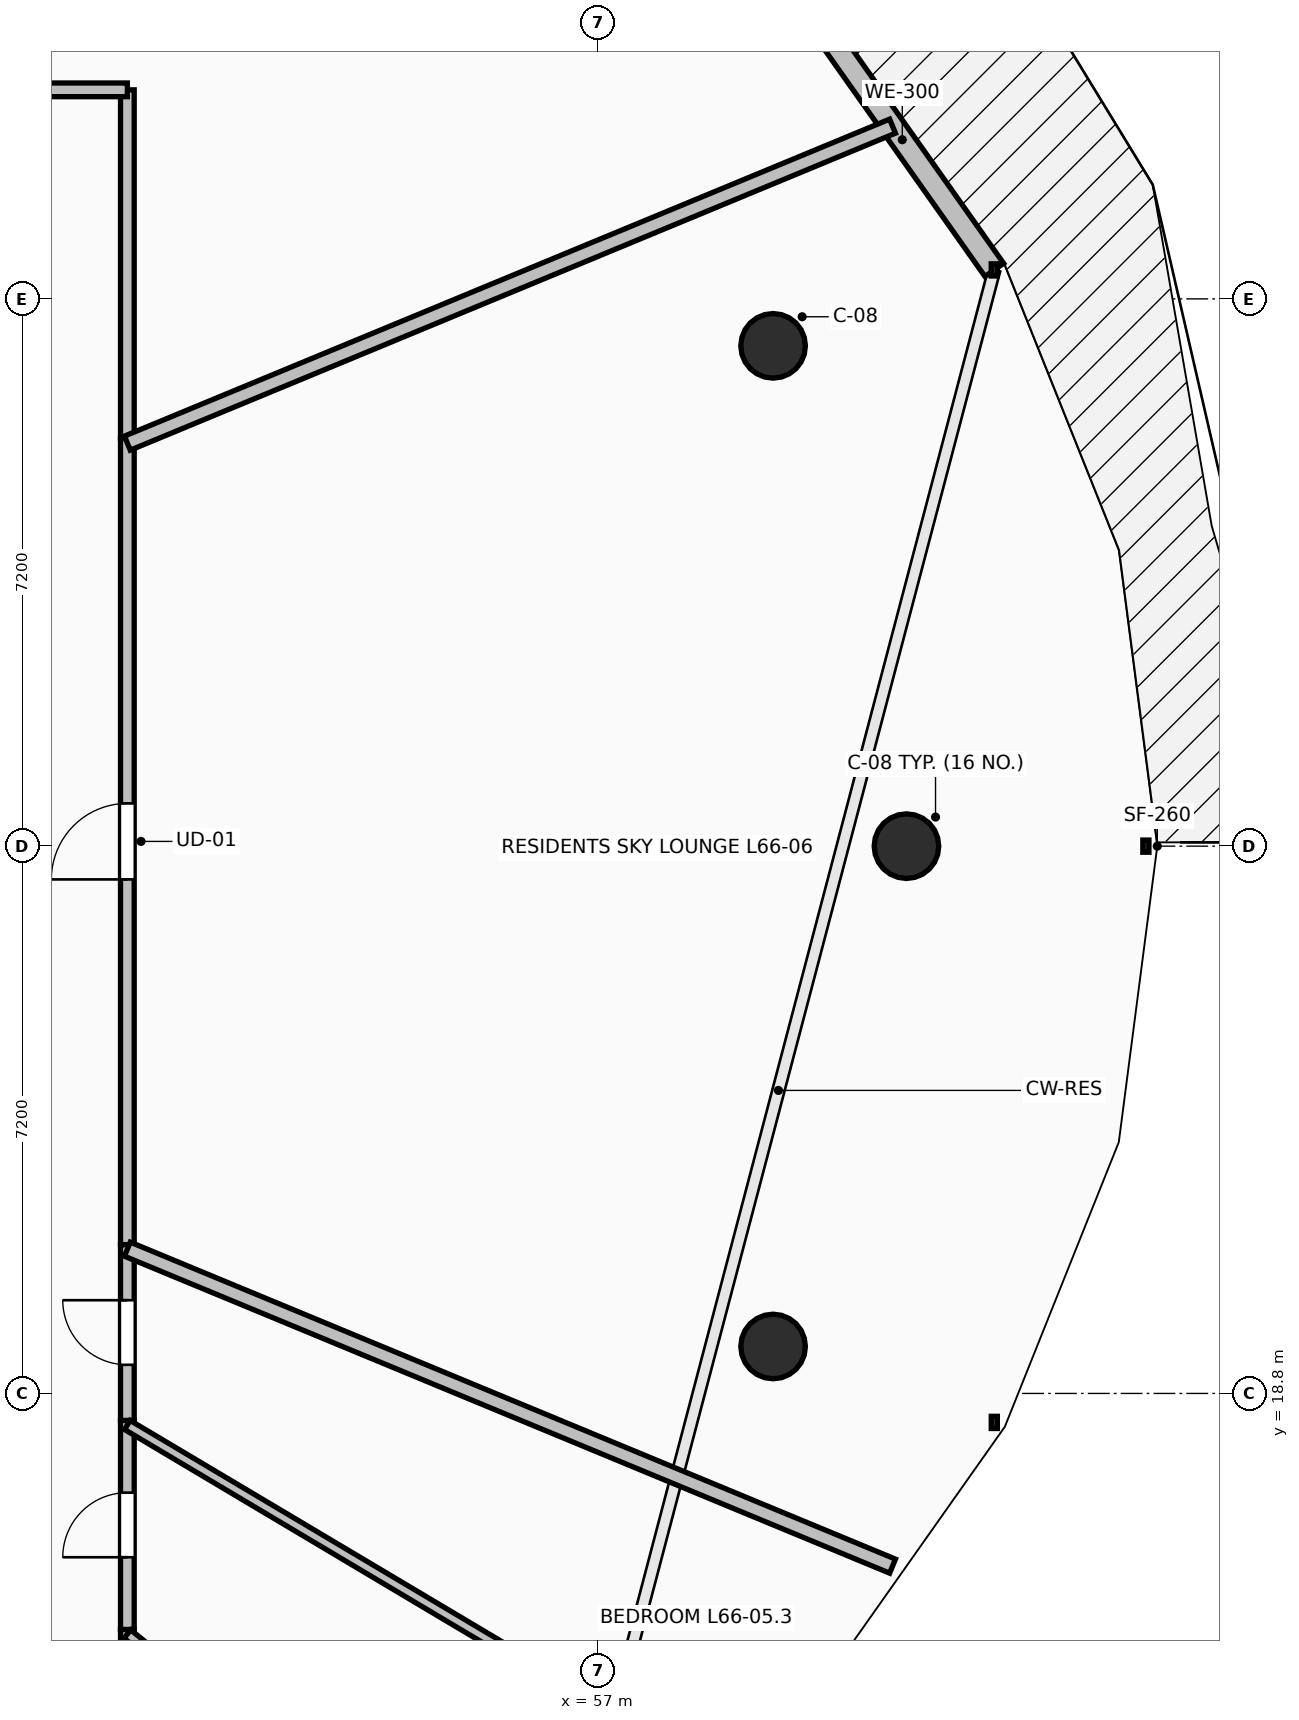
"""IFC4 building model, lengths in metres.
Left out: names, types, materials, properties, quantities, classifications, styles, units other than length and angle.
Written with IfcOpenShell. Run it as: python <this file> out.ifc"""

import sys

from ifc_helpers import new_model, si_unit, direction, frame, frame_2d, origin, origin_2d, place, context, subcontext, project, spatial, rectangle, circle, extrude, element, fill, save


model = new_model("IFC4")
c1 = context("Model", 3, precision=1e-05, world=origin(), true_north=direction((0.0, 1.0)))
c2 = subcontext(c1, "Body", "Model", "MODEL_VIEW")
j1 = project(units=[si_unit("LENGTHUNIT", "METRE"), si_unit("PLANEANGLEUNIT", "RADIAN")], contexts=[c1])
p1 = place(None, origin())
s1 = spatial("IfcSite", under=j1, at=p1, CompositionType="ELEMENT")
p2 = place(p1, origin())
s2 = spatial("IfcBuilding", under=s1, at=p2, CompositionType="ELEMENT")
p3 = place(p2, frame((0.0, 0.0, 244.9)))
s3 = spatial("IfcBuildingStorey", under=s2, at=p3, CompositionType="ELEMENT", Elevation=244.9)
for number, where, z_axis, x_axis in (
    (1, (61.05, 26.0, 0.0), (0.0, 0.0, 1.0), (1.0, 0.0, 0.0)),
    (2, (59.295, 32.582, 0.0), (0.0, 0.0, 1.0), (0.924, 0.383, 0.0)),
    (3, (59.295, 19.418, 0.0), (0.0, 0.0, 1.0), (0.924, -0.383, 0.0)),
):
    element("IfcColumn", number, at=place(p3, frame(where, z_axis=z_axis, x_axis=x_axis)), inside=s3, PredefinedType="COLUMN", context=c2, shape_type="SweptSolid", body=[
        extrude(circle(Radius=0.425, at=origin_2d()), origin(), (0.0, 0.0, 1.0), 3.55),
    ])
p4 = place(p3, frame((62.206, 33.581, 0.0), z_axis=(0.0, 0.0, 1.0), x_axis=(-0.577261247247, 0.816559521668, 0.0)))
e4 = element("IfcWall", 4, at=p4, inside=s3, PredefinedType="STANDARD", context=c2, shape_type="SweptSolid", body=[
    extrude(rectangle(XDim=4.194, YDim=0.3, at=frame_2d((2.097, 0.0))), origin(), (0.0, 0.0, 1.0), 3.29),
])
p5 = place(p3, frame((50.8, 14.05, 0.0), z_axis=(0.0, 0.0, 1.0), x_axis=(0.0, 1.0, 0.0)))
e5 = element("IfcWall", 5, at=p5, inside=s3, PredefinedType="PARTITIONING", context=c2, shape_type="SweptSolid", body=[
    extrude(rectangle(XDim=1.645, YDim=0.18, at=frame_2d((0.823, 0.0))), origin(), (0.0, 0.0, 1.0), 2.482),
])
p6 = place(p3, frame((50.8, 15.695, 0.0), z_axis=(0.0, 0.0, 1.0), x_axis=(0.0, 1.0, 0.0)))
e6 = element("IfcWall", 6, at=p6, inside=s3, PredefinedType="PARTITIONING", context=c2, shape_type="SweptSolid", body=[
    extrude(rectangle(XDim=2.75, YDim=0.18, at=frame_2d((1.375, 0.0))), origin(), (0.0, 0.0, 1.0), 2.482),
])
p7 = place(p6, frame((0.95, 0.0, 0.0)))
e7 = element("IfcOpeningElement", 7, at=p7, cuts=e6, PredefinedType="OPENING", context=c2, shape_type="SweptSolid", body=[
    extrude(rectangle(XDim=0.85, YDim=2.1, at=frame_2d((0.425, 1.05))), frame((0.0, 0.105, 0.0), z_axis=(0.0, -1.0, 0.0), x_axis=(1.0, 0.0, 0.0)), (0.0, 0.0, 1.0), 0.21),
])
p8 = place(p3, frame((50.8, 18.445, 0.0), z_axis=(0.0, 0.0, 1.0), x_axis=(0.0, 1.0, 0.0)))
e8 = element("IfcWall", 8, at=p8, inside=s3, PredefinedType="PARTITIONING", context=c2, shape_type="SweptSolid", body=[
    extrude(rectangle(XDim=2.313, YDim=0.18, at=frame_2d((1.156, 0.0))), origin(), (0.0, 0.0, 1.0), 3.022),
])
p9 = place(p8, frame((0.731, 0.0, 0.0)))
e9 = element("IfcOpeningElement", 9, at=p9, cuts=e8, PredefinedType="OPENING", context=c2, shape_type="SweptSolid", body=[
    extrude(rectangle(XDim=0.85, YDim=2.1, at=frame_2d((0.425, 1.05))), frame((0.0, 0.105, 0.0), z_axis=(0.0, -1.0, 0.0), x_axis=(1.0, 0.0, 0.0)), (0.0, 0.0, 1.0), 0.21),
])
p10 = place(p3, frame((50.8, 20.758, 0.0), z_axis=(0.0, 0.0, 1.0), x_axis=(0.0, 1.0, 0.0)))
e10 = element("IfcWall", 10, at=p10, inside=s3, PredefinedType="PARTITIONING", context=c2, shape_type="SweptSolid", body=[
    extrude(rectangle(XDim=10.609, YDim=0.18, at=frame_2d((5.304, 0.0))), origin(), (0.0, 0.0, 1.0), 2.482),
])
p11 = place(p10, frame((4.804, 0.0, 0.0)))
e11 = element("IfcOpeningElement", 11, at=p11, cuts=e10, PredefinedType="OPENING", context=c2, shape_type="SweptSolid", body=[
    extrude(rectangle(XDim=1.0, YDim=2.15, at=frame_2d((0.5, 1.075))), frame((0.0, 0.105, 0.0), z_axis=(0.0, -1.0, 0.0), x_axis=(1.0, 0.0, 0.0)), (0.0, 0.0, 1.0), 0.21),
])
p12 = place(p3, frame((50.8, 31.367, 0.0), z_axis=(0.0, 0.0, 1.0), x_axis=(0.0, 1.0, 0.0)))
e12 = element("IfcWall", 12, at=p12, inside=s3, PredefinedType="PARTITIONING", context=c2, shape_type="SweptSolid", body=[
    extrude(rectangle(XDim=4.583, YDim=0.18, at=frame_2d((2.292, 0.0))), origin(), (0.0, 0.0, 1.0), 2.482),
])
p13 = place(p3, frame((50.8, 35.95, 0.0), z_axis=(0.0, 0.0, 1.0), x_axis=(-1.0, 0.0, 0.0)))
e13 = element("IfcWall", 13, at=p13, inside=s3, PredefinedType="PARTITIONING", context=c2, shape_type="SweptSolid", body=[
    extrude(rectangle(XDim=8.739, YDim=0.18, at=frame_2d((4.37, 0.0))), origin(), (0.0, 0.0, 1.0), 2.482),
])
p14 = place(p13, frame((3.869, 0.0, 0.0)))
e14 = element("IfcOpeningElement", 14, at=p14, cuts=e13, PredefinedType="OPENING", context=c2, shape_type="SweptSolid", body=[
    extrude(rectangle(XDim=1.0, YDim=2.15, at=frame_2d((0.5, 1.075))), frame((0.0, 0.105, 0.0), z_axis=(0.0, -1.0, 0.0), x_axis=(1.0, 0.0, 0.0)), (0.0, 0.0, 1.0), 0.21),
])
p15 = place(p3, frame((55.828, 11.563, 0.0), z_axis=(0.0, 0.0, 1.0), x_axis=(-0.777103372697, 0.62937298015, 0.0)))
e15 = element("IfcWall", 15, at=p15, inside=s3, PredefinedType="PARTITIONING", context=c2, shape_type="SweptSolid", body=[
    extrude(rectangle(XDim=6.47, YDim=0.14, at=frame_2d((3.235, 0.0))), origin(), (0.0, 0.0, 1.0), 2.482),
])
p16 = place(p3, frame((58.493, 13.808, 0.0), z_axis=(0.0, 0.0, 1.0), x_axis=(-0.859400180079, 0.511303560011, 0.0)))
e16 = element("IfcWall", 16, at=p16, inside=s3, PredefinedType="PARTITIONING", context=c2, shape_type="SweptSolid", body=[
    extrude(rectangle(XDim=8.951, YDim=0.14, at=frame_2d((4.476, 0.0))), origin(), (0.0, 0.0, 1.0), 2.874),
])
p17 = place(p3, frame((60.867, 16.528, 0.0), z_axis=(0.0, 0.0, 1.0), x_axis=(-0.923877013663, 0.382689513347, 0.0)))
e17 = element("IfcWall", 17, at=p17, inside=s3, PredefinedType="PARTITIONING", context=c2, shape_type="SweptSolid", body=[
    extrude(rectangle(XDim=10.896, YDim=0.2, at=frame_2d((5.448, 0.0))), origin(), (0.0, 0.0, 1.0), 2.874),
])
p18 = place(p3, frame((60.867, 35.472, 0.0), z_axis=(0.0, 0.0, 1.0), x_axis=(-0.923877013663, -0.382689513347, 0.0)))
e18 = element("IfcWall", 18, at=p18, inside=s3, PredefinedType="PARTITIONING", context=c2, shape_type="SweptSolid", body=[
    extrude(rectangle(XDim=10.896, YDim=0.2, at=frame_2d((5.448, 0.0))), origin(), (0.0, 0.0, 1.0), 2.482),
])
p19 = place(p11, origin())
e19 = element("IfcDoor", 19, at=p19, inside=s3, OperationType="SINGLE_SWING_LEFT", PredefinedType="DOOR", context=c2, shape_type="SweptSolid", body=[
    extrude(rectangle(XDim=1.0, YDim=2.15, at=frame_2d((0.5, 1.075))), frame((0.0, 0.025, 0.0), z_axis=(0.0, -1.0, 0.0), x_axis=(1.0, 0.0, 0.0)), (0.0, 0.0, 1.0), 0.05),
])
fill(e11, e19)
p20 = place(p7, origin())
e20 = element("IfcDoor", 20, at=p20, inside=s3, OperationType="SINGLE_SWING_LEFT", PredefinedType="DOOR", context=c2, shape_type="SweptSolid", body=[
    extrude(rectangle(XDim=0.85, YDim=2.1, at=frame_2d((0.425, 1.05))), frame((0.0, 0.025, 0.0), z_axis=(0.0, -1.0, 0.0), x_axis=(1.0, 0.0, 0.0)), (0.0, 0.0, 1.0), 0.05),
])
fill(e7, e20)
p21 = place(p9, origin())
e21 = element("IfcDoor", 21, at=p21, inside=s3, OperationType="SINGLE_SWING_RIGHT", PredefinedType="DOOR", context=c2, shape_type="SweptSolid", body=[
    extrude(rectangle(XDim=0.85, YDim=2.1, at=frame_2d((0.425, 1.05))), frame((0.0, 0.025, 0.0), z_axis=(0.0, -1.0, 0.0), x_axis=(1.0, 0.0, 0.0)), (0.0, 0.0, 1.0), 0.05),
])
fill(e9, e21)
save(model, sys.argv[1])
